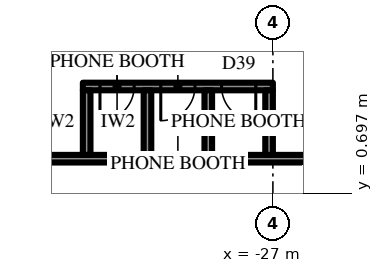
"""IFC4 building model, lengths in metres.
Left out: names, types, materials, properties, quantities, classifications, styles, units other than length and angle.
Written with IfcOpenShell. Run it as: python <this file> out.ifc"""

import sys

from ifc_helpers import new_model, si_unit, direction, frame, frame_2d, origin, place, context, subcontext, project, spatial, rectangle, extrude, element, fill, save


model = new_model("IFC4")
c1 = context("Model", 3, precision=1e-05, world=origin(), true_north=direction((0.0, 1.0)))
c2 = subcontext(c1, "Body", "Model", "MODEL_VIEW")
j1 = project(units=[si_unit("LENGTHUNIT", "METRE"), si_unit("PLANEANGLEUNIT", "RADIAN")], contexts=[c1])
p1 = place(None, origin())
s1 = spatial("IfcSite", under=j1, at=p1, CompositionType="ELEMENT")
p2 = place(p1, origin())
s2 = spatial("IfcBuilding", under=s1, at=p2, CompositionType="ELEMENT")
p3 = place(p2, frame((0.0, 0.0, 78.1)))
s3 = spatial("IfcBuildingStorey", under=s2, at=p3, CompositionType="ELEMENT", Elevation=78.1)
p4 = place(p3, frame((-21.1, 1.6, 0.0), z_axis=(0.0, 0.0, 1.0), x_axis=(-1.0, 0.0, 0.0)))
e1 = element("IfcWall", 1, at=p4, inside=s3, PredefinedType="PARTITIONING", context=c2, shape_type="SweptSolid", body=[
    extrude(rectangle(XDim=15.273, YDim=0.2, at=frame_2d((7.636, 0.0))), origin(), (0.0, 0.0, 1.0), 4.0),
])
p5 = place(p4, frame((1.027, 0.0, 0.0)))
e2 = element("IfcOpeningElement", 2, at=p5, cuts=e1, PredefinedType="OPENING", context=c2, shape_type="SweptSolid", body=[
    extrude(rectangle(XDim=1.0, YDim=2.2, at=frame_2d((0.5, 1.1))), frame((0.0, 0.11, 0.0), z_axis=(0.0, -1.0, 0.0), x_axis=(1.0, 0.0, 0.0)), (0.0, 0.0, 1.0), 0.22),
])
p6 = place(p3, frame((-27.0, 3.5, 0.0), z_axis=(0.0, 0.0, 1.0), x_axis=(-1.0, 0.0, 0.0)))
e3 = element("IfcWall", 3, at=p6, inside=s3, PredefinedType="PARTITIONING", context=c2, shape_type="SweptSolid", body=[
    extrude(rectangle(XDim=5.0, YDim=0.2, at=frame_2d((2.5, 0.0))), origin(), (0.0, 0.0, 1.0), 4.0),
])
p7 = place(p6, frame((0.45, 0.0, 0.0)))
e4 = element("IfcOpeningElement", 4, at=p7, cuts=e3, PredefinedType="OPENING", context=c2, shape_type="SweptSolid", body=[
    extrude(rectangle(XDim=0.9, YDim=2.2, at=frame_2d((0.45, 1.1))), frame((0.0, 0.11, 0.0), z_axis=(0.0, -1.0, 0.0), x_axis=(1.0, 0.0, 0.0)), (0.0, 0.0, 1.0), 0.22),
])
p8 = place(p6, frame((2.05, 0.0, 0.0)))
e5 = element("IfcOpeningElement", 5, at=p8, cuts=e3, PredefinedType="OPENING", context=c2, shape_type="SweptSolid", body=[
    extrude(rectangle(XDim=0.9, YDim=2.2, at=frame_2d((0.45, 1.1))), frame((0.0, 0.11, 0.0), z_axis=(0.0, -1.0, 0.0), x_axis=(1.0, 0.0, 0.0)), (0.0, 0.0, 1.0), 0.22),
])
p9 = place(p6, frame((3.65, 0.0, 0.0)))
e6 = element("IfcOpeningElement", 6, at=p9, cuts=e3, PredefinedType="OPENING", context=c2, shape_type="SweptSolid", body=[
    extrude(rectangle(XDim=0.9, YDim=2.2, at=frame_2d((0.45, 1.1))), frame((0.0, 0.11, 0.0), z_axis=(0.0, -1.0, 0.0), x_axis=(1.0, 0.0, 0.0)), (0.0, 0.0, 1.0), 0.22),
])
for number, where, z_axis, x_axis in (
    (7, (-27.1, 1.7, 0.0), (0.0, 0.0, 1.0), (0.0, 1.0, 0.0)),
    (8, (-28.7, 1.7, 0.0), (0.0, 0.0, 1.0), (0.0, 1.0, 0.0)),
    (9, (-30.3, 1.7, 0.0), (0.0, 0.0, 1.0), (0.0, 1.0, 0.0)),
    (10, (-31.9, 1.7, 0.0), (0.0, 0.0, 1.0), (0.0, 1.0, 0.0)),
):
    element("IfcWall", number, at=place(p3, frame(where, z_axis=z_axis, x_axis=x_axis)), inside=s3, PredefinedType="PARTITIONING", context=c2, shape_type="SweptSolid", body=[
        extrude(rectangle(XDim=1.7, YDim=0.2, at=frame_2d((0.85, 0.0))), origin(), (0.0, 0.0, 1.0), 4.0),
    ])
p10 = place(p7, origin())
e11 = element("IfcDoor", 11, at=p10, inside=s3, OperationType="SINGLE_SWING_RIGHT", PredefinedType="DOOR", context=c2, shape_type="SweptSolid", body=[
    extrude(rectangle(XDim=0.9, YDim=2.2, at=frame_2d((0.45, 1.1))), frame((0.0, 0.025, 0.0), z_axis=(0.0, -1.0, 0.0), x_axis=(1.0, 0.0, 0.0)), (0.0, 0.0, 1.0), 0.05),
])
fill(e4, e11)
p11 = place(p8, origin())
e12 = element("IfcDoor", 12, at=p11, inside=s3, OperationType="SINGLE_SWING_LEFT", PredefinedType="DOOR", context=c2, shape_type="SweptSolid", body=[
    extrude(rectangle(XDim=0.9, YDim=2.2, at=frame_2d((0.45, 1.1))), frame((0.0, 0.025, 0.0), z_axis=(0.0, -1.0, 0.0), x_axis=(1.0, 0.0, 0.0)), (0.0, 0.0, 1.0), 0.05),
])
fill(e5, e12)
p12 = place(p9, origin())
e13 = element("IfcDoor", 13, at=p12, inside=s3, OperationType="SINGLE_SWING_LEFT", PredefinedType="DOOR", context=c2, shape_type="SweptSolid", body=[
    extrude(rectangle(XDim=0.9, YDim=2.2, at=frame_2d((0.45, 1.1))), frame((0.0, 0.025, 0.0), z_axis=(0.0, -1.0, 0.0), x_axis=(1.0, 0.0, 0.0)), (0.0, 0.0, 1.0), 0.05),
])
fill(e6, e13)
save(model, sys.argv[1])
